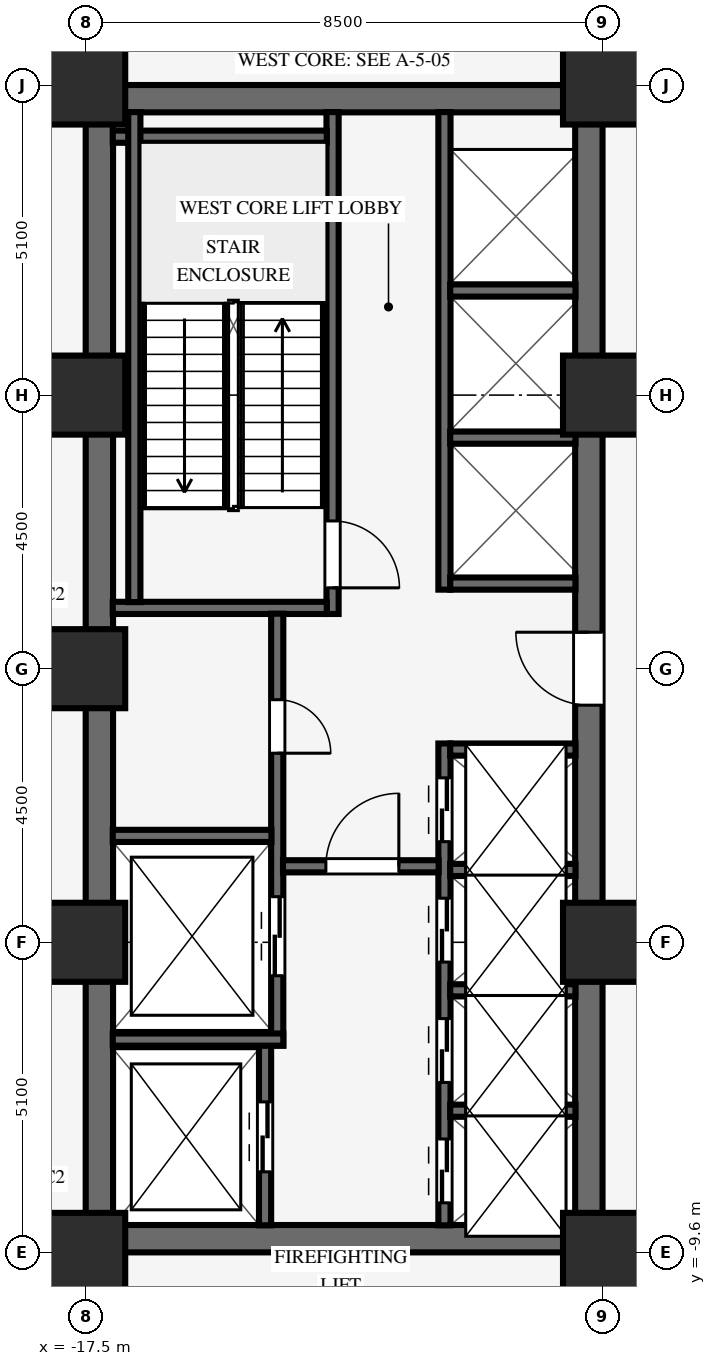
"""IFC4 building model, lengths in metres.
Left out: names, types, materials, properties, quantities, classifications, styles, units other than length and angle.
Written with IfcOpenShell. Run it as: python <this file> out.ifc"""

import sys

from ifc_helpers import new_model, si_unit, direction, frame, frame_2d, origin, origin_2d, place, context, subcontext, project, spatial, rectangle, extrude, source, transform, mapped, element, fill, save


model = new_model("IFC4")
c1 = context("Model", 3, precision=1e-05, world=origin(), true_north=direction((0.0, 1.0)))
c2 = subcontext(c1, "Body", "Model", "MODEL_VIEW")
j1 = project(units=[si_unit("LENGTHUNIT", "METRE"), si_unit("PLANEANGLEUNIT", "RADIAN")], contexts=[c1])
p1 = place(None, origin())
s1 = spatial("IfcSite", under=j1, at=p1, CompositionType="ELEMENT")
p2 = place(p1, origin())
s2 = spatial("IfcBuilding", under=s1, at=p2, CompositionType="ELEMENT")
p3 = place(p2, frame((0.0, 0.0, 18.4)))
s3 = spatial("IfcBuildingStorey", under=s2, at=p3, CompositionType="ELEMENT", Elevation=18.4)
for number, where, z_axis, x_axis in (
    (1, (-17.5, -9.375, 0.0), (0.0, 0.0, 1.0), (1.0, 0.0, 0.0)),
    (2, (-17.5, 9.375, 0.0), (0.0, 0.0, 1.0), (1.0, 0.0, 0.0)),
):
    element("IfcWall", number, at=place(p3, frame(where, z_axis=z_axis, x_axis=x_axis)), inside=s3, PredefinedType="SHEAR", context=c2, shape_type="SweptSolid", body=[
        extrude(rectangle(XDim=8.5, YDim=0.45, at=frame_2d((4.25, 0.0))), origin(), (0.0, 0.0, 1.0), 4.2),
    ])
p4 = place(p3, frame((-17.275, -9.155, 0.0), z_axis=(0.0, 0.0, 1.0), x_axis=(0.0, 1.0, 0.0)))
e3 = element("IfcWall", 3, at=p4, inside=s3, PredefinedType="SHEAR", context=c2, shape_type="SweptSolid", body=[
    extrude(rectangle(XDim=18.31, YDim=0.45, at=frame_2d((9.155, 0.0))), origin(), (0.0, 0.0, 1.0), 4.2),
])
p5 = place(p3, frame((-9.225, -9.155, 0.0), z_axis=(0.0, 0.0, 1.0), x_axis=(0.0, 1.0, 0.0)))
e4 = element("IfcWall", 4, at=p5, inside=s3, PredefinedType="SHEAR", context=c2, shape_type="SweptSolid", body=[
    extrude(rectangle(XDim=18.31, YDim=0.45, at=frame_2d((9.155, 0.0))), origin(), (0.0, 0.0, 1.0), 4.2),
])
p6 = place(p5, frame((8.555, 0.0, 0.0)))
e5 = element("IfcOpeningElement", 5, at=p6, cuts=e4, PredefinedType="OPENING", context=c2, shape_type="SweptSolid", body=[
    extrude(rectangle(XDim=1.2, YDim=2.15, at=frame_2d((0.6, 1.075))), frame((0.0, 0.235, 0.0), z_axis=(0.0, -1.0, 0.0), x_axis=(1.0, 0.0, 0.0)), (0.0, 0.0, 1.0), 0.47),
])
for number, where, z_axis, x_axis in (
    (6, (-17.5, -9.6, 0.0), (0.0, 0.0, 1.0), (1.0, 0.0, 0.0)),
    (7, (-17.5, -4.5, 0.0), (0.0, 0.0, 1.0), (1.0, 0.0, 0.0)),
    (8, (-17.5, 4.5, 0.0), (0.0, 0.0, 1.0), (1.0, 0.0, 0.0)),
    (9, (-17.5, 9.6, 0.0), (0.0, 0.0, 1.0), (1.0, 0.0, 0.0)),
    (10, (-9.0, -9.6, 0.0), (0.0, 0.0, 1.0), (1.0, 0.0, 0.0)),
    (11, (-9.0, -4.5, 0.0), (0.0, 0.0, 1.0), (1.0, 0.0, 0.0)),
    (12, (-9.0, 4.5, 0.0), (0.0, 0.0, 1.0), (1.0, 0.0, 0.0)),
    (13, (-9.0, 9.6, 0.0), (0.0, 0.0, 1.0), (1.0, 0.0, 0.0)),
    (14, (-17.5, 0.0, 0.0), (0.0, 0.0, 1.0), (1.0, 0.0, 0.0)),
):
    element("IfcColumn", number, at=place(p3, frame(where, z_axis=z_axis, x_axis=x_axis)), inside=s3, PredefinedType="COLUMN", context=c2, shape_type="SweptSolid", body=[
        extrude(rectangle(XDim=1.3, YDim=1.3, at=origin_2d()), origin(), (0.0, 0.0, 1.0), 4.2),
    ])
p7 = place(p3, frame((-13.44, 0.9, 0.0), z_axis=(0.0, 0.0, 1.0), x_axis=(0.0, 1.0, 0.0)))
e15 = element("IfcWall", 15, at=p7, inside=s3, PredefinedType="SHEAR", context=c2, shape_type="SweptSolid", body=[
    extrude(rectangle(XDim=8.255, YDim=0.2, at=frame_2d((4.127, 0.0))), origin(), (0.0, 0.0, 1.0), 4.2),
])
p8 = place(p7, frame((1.53, 0.0, 0.0), z_axis=(0.0, 0.0, 1.0), x_axis=(-1.0, 0.0, 0.0)))
e16 = element("IfcOpeningElement", 16, at=p8, cuts=e15, PredefinedType="OPENING", context=c2, shape_type="SweptSolid", body=[
    extrude(rectangle(XDim=1.1, YDim=2.15, at=frame_2d((0.55, 1.075))), frame((0.0, 0.11, 0.0), z_axis=(0.0, -1.0, 0.0), x_axis=(1.0, 0.0, 0.0)), (0.0, 0.0, 1.0), 0.22),
])
for number, where, z_axis, x_axis in (
    (17, (-17.055, 1.0, 0.0), (0.0, 0.0, 1.0), (1.0, 0.0, 0.0)),
    (18, (-17.055, 8.75, 0.0), (0.0, 0.0, 1.0), (1.0, 0.0, 0.0)),
):
    element("IfcWall", number, at=place(p3, frame(where, z_axis=z_axis, x_axis=x_axis)), inside=s3, PredefinedType="SHEAR", context=c2, shape_type="SweptSolid", body=[
        extrude(rectangle(XDim=3.52, YDim=0.2, at=frame_2d((1.76, 0.0))), origin(), (0.0, 0.0, 1.0), 4.2),
    ])
p9 = place(p3, frame((-16.7, 1.095, 0.0), z_axis=(0.0, 0.0, 1.0), x_axis=(0.0, 1.0, 0.0)))
e19 = element("IfcWall", 19, at=p9, inside=s3, PredefinedType="SHEAR", context=c2, shape_type="SweptSolid", body=[
    extrude(rectangle(XDim=8.06, YDim=0.2, at=frame_2d((4.03, 0.0))), origin(), (0.0, 0.0, 1.0), 4.2),
])
p10 = place(p3, frame((-14.55, -9.155, 0.0), z_axis=(0.0, 0.0, 1.0), x_axis=(0.0, 1.0, 0.0)))
e20 = element("IfcWall", 20, at=p10, inside=s3, PredefinedType="SHEAR", context=c2, shape_type="SweptSolid", body=[
    extrude(rectangle(XDim=2.96, YDim=0.2, at=frame_2d((1.48, 0.0))), origin(), (0.0, 0.0, 1.0), 4.2),
])
p11 = place(p10, frame((0.88, 0.0, 0.0)))
e21 = element("IfcOpeningElement", 21, at=p11, cuts=e20, PredefinedType="OPENING", context=c2, shape_type="SweptSolid", body=[
    extrude(rectangle(XDim=1.15, YDim=2.15, at=frame_2d((0.575, 1.075))), frame((0.0, 0.11, 0.0), z_axis=(0.0, -1.0, 0.0), x_axis=(1.0, 0.0, 0.0)), (0.0, 0.0, 1.0), 0.22),
])
p12 = place(p3, frame((-14.35, -6.2, 0.0), z_axis=(0.0, 0.0, 1.0), x_axis=(0.0, 1.0, 0.0)))
e22 = element("IfcWall", 22, at=p12, inside=s3, PredefinedType="SHEAR", context=c2, shape_type="SweptSolid", body=[
    extrude(rectangle(XDim=7.105, YDim=0.2, at=frame_2d((3.552, 0.0))), origin(), (0.0, 0.0, 1.0), 4.2),
])
p13 = place(p12, frame((5.69, 0.0, 0.0), z_axis=(0.0, 0.0, 1.0), x_axis=(-1.0, 0.0, 0.0)))
e23 = element("IfcOpeningElement", 23, at=p13, cuts=e22, PredefinedType="OPENING", context=c2, shape_type="SweptSolid", body=[
    extrude(rectangle(XDim=0.88, YDim=2.1, at=frame_2d((0.44, 1.05))), frame((0.0, 0.11, 0.0), z_axis=(0.0, -1.0, 0.0), x_axis=(1.0, 0.0, 0.0)), (0.0, 0.0, 1.0), 0.22),
])
p14 = place(p12, frame((1.15, 0.0, 0.0)))
e24 = element("IfcOpeningElement", 24, at=p14, cuts=e22, PredefinedType="OPENING", context=c2, shape_type="SweptSolid", body=[
    extrude(rectangle(XDim=1.3, YDim=2.2, at=frame_2d((0.65, 1.1))), frame((0.0, 0.11, 0.0), z_axis=(0.0, -1.0, 0.0), x_axis=(1.0, 0.0, 0.0)), (0.0, 0.0, 1.0), 0.22),
])
p15 = place(p3, frame((-17.055, -6.1, 0.0), z_axis=(0.0, 0.0, 1.0), x_axis=(1.0, 0.0, 0.0)))
e25 = element("IfcWall", 25, at=p15, inside=s3, PredefinedType="SHEAR", context=c2, shape_type="SweptSolid", body=[
    extrude(rectangle(XDim=2.805, YDim=0.2, at=frame_2d((1.402, 0.0))), origin(), (0.0, 0.0, 1.0), 4.2),
])
p16 = place(p3, frame((-17.055, -2.75, 0.0), z_axis=(0.0, 0.0, 1.0), x_axis=(1.0, 0.0, 0.0)))
e26 = element("IfcWall", 26, at=p16, inside=s3, PredefinedType="SHEAR", context=c2, shape_type="SweptSolid", body=[
    extrude(rectangle(XDim=2.61, YDim=0.2, at=frame_2d((1.305, 0.0))), origin(), (0.0, 0.0, 1.0), 4.2),
])
p17 = place(p3, frame((-11.6, -9.155, 0.0), z_axis=(0.0, 0.0, 1.0), x_axis=(0.0, 1.0, 0.0)))
e27 = element("IfcWall", 27, at=p17, inside=s3, PredefinedType="SHEAR", context=c2, shape_type="SweptSolid", body=[
    extrude(rectangle(XDim=7.925, YDim=0.2, at=frame_2d((3.962, 0.0))), origin(), (0.0, 0.0, 1.0), 4.2),
])
p18 = place(p17, frame((0.37, 0.0, 0.0)))
e28 = element("IfcOpeningElement", 28, at=p18, cuts=e27, PredefinedType="OPENING", context=c2, shape_type="SweptSolid", body=[
    extrude(rectangle(XDim=1.05, YDim=2.15, at=frame_2d((0.525, 1.075))), frame((0.0, 0.11, 0.0), z_axis=(0.0, -1.0, 0.0), x_axis=(1.0, 0.0, 0.0)), (0.0, 0.0, 1.0), 0.22),
])
p19 = place(p17, frame((2.35, 0.0, 0.0)))
e29 = element("IfcOpeningElement", 29, at=p19, cuts=e27, PredefinedType="OPENING", context=c2, shape_type="SweptSolid", body=[
    extrude(rectangle(XDim=1.05, YDim=2.15, at=frame_2d((0.525, 1.075))), frame((0.0, 0.11, 0.0), z_axis=(0.0, -1.0, 0.0), x_axis=(1.0, 0.0, 0.0)), (0.0, 0.0, 1.0), 0.22),
])
p20 = place(p17, frame((4.33, 0.0, 0.0)))
e30 = element("IfcOpeningElement", 30, at=p20, cuts=e27, PredefinedType="OPENING", context=c2, shape_type="SweptSolid", body=[
    extrude(rectangle(XDim=1.05, YDim=2.15, at=frame_2d((0.525, 1.075))), frame((0.0, 0.11, 0.0), z_axis=(0.0, -1.0, 0.0), x_axis=(1.0, 0.0, 0.0)), (0.0, 0.0, 1.0), 0.22),
])
p21 = place(p17, frame((6.31, 0.0, 0.0)))
e31 = element("IfcOpeningElement", 31, at=p21, cuts=e27, PredefinedType="OPENING", context=c2, shape_type="SweptSolid", body=[
    extrude(rectangle(XDim=1.05, YDim=2.15, at=frame_2d((0.525, 1.075))), frame((0.0, 0.11, 0.0), z_axis=(0.0, -1.0, 0.0), x_axis=(1.0, 0.0, 0.0)), (0.0, 0.0, 1.0), 0.22),
])
p22 = place(p3, frame((-14.255, -3.25, 0.0), z_axis=(0.0, 0.0, 1.0), x_axis=(1.0, 0.0, 0.0)))
e32 = element("IfcWall", 32, at=p22, inside=s3, PredefinedType="SHEAR", context=c2, shape_type="SweptSolid", body=[
    extrude(rectangle(XDim=2.56, YDim=0.2, at=frame_2d((1.28, 0.0))), origin(), (0.0, 0.0, 1.0), 4.2),
])
p23 = place(p22, frame((0.705, 0.0, 0.0)))
e33 = element("IfcOpeningElement", 33, at=p23, cuts=e32, PredefinedType="OPENING", context=c2, shape_type="SweptSolid", body=[
    extrude(rectangle(XDim=1.2, YDim=2.15, at=frame_2d((0.6, 1.075))), frame((0.0, 0.11, 0.0), z_axis=(0.0, -1.0, 0.0), x_axis=(1.0, 0.0, 0.0)), (0.0, 0.0, 1.0), 0.22),
])
for number, where, z_axis, x_axis in (
    (34, (-11.505, -7.27, 0.0), (0.0, 0.0, 1.0), (1.0, 0.0, 0.0)),
    (35, (-11.505, -5.29, 0.0), (0.0, 0.0, 1.0), (1.0, 0.0, 0.0)),
    (36, (-11.505, -3.31, 0.0), (0.0, 0.0, 1.0), (1.0, 0.0, 0.0)),
    (37, (-11.505, -1.33, 0.0), (0.0, 0.0, 1.0), (1.0, 0.0, 0.0)),
):
    element("IfcWall", number, at=place(p3, frame(where, z_axis=z_axis, x_axis=x_axis)), inside=s3, PredefinedType="SHEAR", context=c2, shape_type="SweptSolid", body=[
        extrude(rectangle(XDim=2.06, YDim=0.2, at=frame_2d((1.03, 0.0))), origin(), (0.0, 0.0, 1.0), 4.2),
    ])
p24 = place(p3, frame((-11.6, 1.3, 0.0), z_axis=(0.0, 0.0, 1.0), x_axis=(0.0, 1.0, 0.0)))
e38 = element("IfcWall", 38, at=p24, inside=s3, PredefinedType="SHEAR", context=c2, shape_type="SweptSolid", body=[
    extrude(rectangle(XDim=7.855, YDim=0.2, at=frame_2d((3.927, 0.0))), origin(), (0.0, 0.0, 1.0), 4.2),
])
for number, where, z_axis, x_axis in (
    (39, (-11.505, 1.4, 0.0), (0.0, 0.0, 1.0), (1.0, 0.0, 0.0)),
    (40, (-11.505, 3.8, 0.0), (0.0, 0.0, 1.0), (1.0, 0.0, 0.0)),
    (41, (-11.505, 6.22, 0.0), (0.0, 0.0, 1.0), (1.0, 0.0, 0.0)),
):
    element("IfcWall", number, at=place(p3, frame(where, z_axis=z_axis, x_axis=x_axis)), inside=s3, PredefinedType="SHEAR", context=c2, shape_type="SweptSolid", body=[
        extrude(rectangle(XDim=2.06, YDim=0.2, at=frame_2d((1.03, 0.0))), origin(), (0.0, 0.0, 1.0), 4.2),
    ])
m1 = source(origin(), c2, "Body", "SweptSolid", [
    extrude(rectangle(XDim=1.1, YDim=2.15, at=frame_2d((0.55, 1.075))), frame((0.0, 0.025, 0.0), z_axis=(0.0, -1.0, 0.0), x_axis=(1.0, 0.0, 0.0)), (0.0, 0.0, 1.0), 0.05),
])
p25 = place(p8, origin())
e42 = element("IfcDoor", 42, at=p25, inside=s3, OperationType="SINGLE_SWING_RIGHT", PredefinedType="DOOR", context=c2, shape_type="MappedRepresentation", body=[
    mapped(m1, transform((0.0, 0.0, 0.0), scale=1.0)),
])
fill(e16, e42)
m2 = source(origin(), c2, "Body", "SweptSolid", [
    extrude(rectangle(XDim=0.88, YDim=2.1, at=frame_2d((0.44, 1.05))), frame((0.0, 0.025, 0.0), z_axis=(0.0, -1.0, 0.0), x_axis=(1.0, 0.0, 0.0)), (0.0, 0.0, 1.0), 0.05),
])
p26 = place(p13, origin())
e43 = element("IfcDoor", 43, at=p26, inside=s3, OperationType="SINGLE_SWING_RIGHT", PredefinedType="DOOR", context=c2, shape_type="MappedRepresentation", body=[
    mapped(m2, transform((0.0, 0.0, 0.0), scale=1.0)),
])
fill(e23, e43)
m3 = source(origin(), c2, "Body", "SweptSolid", [
    extrude(rectangle(XDim=1.2, YDim=2.15, at=frame_2d((0.6, 1.075))), frame((0.0, 0.025, 0.0), z_axis=(0.0, -1.0, 0.0), x_axis=(1.0, 0.0, 0.0)), (0.0, 0.0, 1.0), 0.05),
])
p27 = place(p23, origin())
e44 = element("IfcDoor", 44, at=p27, inside=s3, OperationType="SINGLE_SWING_RIGHT", PredefinedType="DOOR", context=c2, shape_type="MappedRepresentation", body=[
    mapped(m3, transform((0.0, 0.0, 0.0), scale=1.0)),
])
fill(e33, e44)
p28 = place(p6, origin())
e45 = element("IfcDoor", 45, at=p28, inside=s3, OperationType="SINGLE_SWING_RIGHT", PredefinedType="DOOR", context=c2, shape_type="MappedRepresentation", body=[
    mapped(m3, transform((0.0, 0.0, 0.0), scale=1.0)),
])
fill(e5, e45)
m4 = source(origin(), c2, "Body", "SweptSolid", [
    extrude(rectangle(XDim=1.15, YDim=2.15, at=frame_2d((0.575, 1.075))), frame((0.0, 0.025, 0.0), z_axis=(0.0, -1.0, 0.0), x_axis=(1.0, 0.0, 0.0)), (0.0, 0.0, 1.0), 0.05),
])
p29 = place(p11, origin())
e46 = element("IfcDoor", 46, at=p29, inside=s3, OperationType="DOUBLE_DOOR_SLIDING", PredefinedType="DOOR", context=c2, shape_type="MappedRepresentation", body=[
    mapped(m4, transform((0.0, 0.0, 0.0), scale=1.0)),
])
fill(e21, e46)
m5 = source(origin(), c2, "Body", "SweptSolid", [
    extrude(rectangle(XDim=1.3, YDim=2.2, at=frame_2d((0.65, 1.1))), frame((0.0, 0.025, 0.0), z_axis=(0.0, -1.0, 0.0), x_axis=(1.0, 0.0, 0.0)), (0.0, 0.0, 1.0), 0.05),
])
p30 = place(p14, origin())
e47 = element("IfcDoor", 47, at=p30, inside=s3, OperationType="DOUBLE_DOOR_SLIDING", PredefinedType="DOOR", context=c2, shape_type="MappedRepresentation", body=[
    mapped(m5, transform((0.0, 0.0, 0.0), scale=1.0)),
])
fill(e24, e47)
m6 = source(origin(), c2, "Body", "SweptSolid", [
    extrude(rectangle(XDim=1.05, YDim=2.15, at=frame_2d((0.525, 1.075))), frame((0.0, 0.025, 0.0), z_axis=(0.0, -1.0, 0.0), x_axis=(1.0, 0.0, 0.0)), (0.0, 0.0, 1.0), 0.05),
])
p31 = place(p18, origin())
e48 = element("IfcDoor", 48, at=p31, inside=s3, OperationType="DOUBLE_DOOR_SLIDING", PredefinedType="DOOR", context=c2, shape_type="MappedRepresentation", body=[
    mapped(m6, transform((0.0, 0.0, 0.0), scale=1.0)),
])
fill(e28, e48)
p32 = place(p19, origin())
e49 = element("IfcDoor", 49, at=p32, inside=s3, OperationType="DOUBLE_DOOR_SLIDING", PredefinedType="DOOR", context=c2, shape_type="MappedRepresentation", body=[
    mapped(m6, transform((0.0, 0.0, 0.0), scale=1.0)),
])
fill(e29, e49)
p33 = place(p20, origin())
e50 = element("IfcDoor", 50, at=p33, inside=s3, OperationType="DOUBLE_DOOR_SLIDING", PredefinedType="DOOR", context=c2, shape_type="MappedRepresentation", body=[
    mapped(m6, transform((0.0, 0.0, 0.0), scale=1.0)),
])
fill(e30, e50)
p34 = place(p21, origin())
e51 = element("IfcDoor", 51, at=p34, inside=s3, OperationType="DOUBLE_DOOR_SLIDING", PredefinedType="DOOR", context=c2, shape_type="MappedRepresentation", body=[
    mapped(m6, transform((0.0, 0.0, 0.0), scale=1.0)),
])
fill(e31, e51)
save(model, sys.argv[1])
